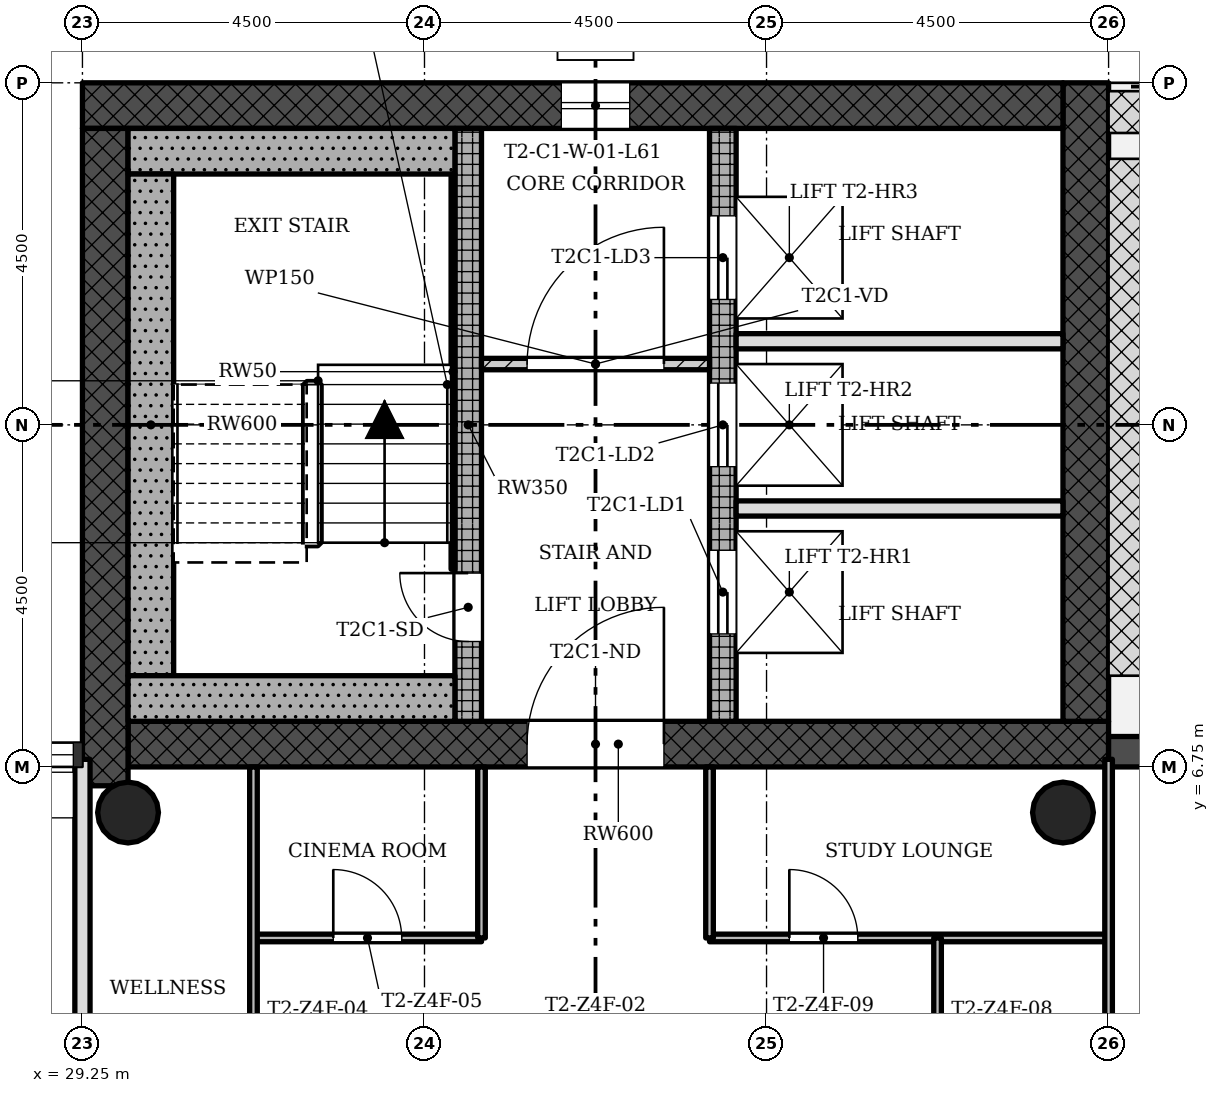
"""IFC4 building model, lengths in metres.
Left out: names, types, materials, properties, quantities, classifications, styles, units other than length and angle.
Written with IfcOpenShell. Run it as: python <this file> out.ifc"""

import sys

from ifc_helpers import new_model, si_unit, direction, frame, frame_2d, origin, origin_2d, place, context, subcontext, project, spatial, rectangle, hollow_circle, extrude, element, fill, save


model = new_model("IFC4")
c1 = context("Model", 3, precision=1e-05, world=origin(), true_north=direction((0.0, 1.0)))
c2 = subcontext(c1, "Body", "Model", "MODEL_VIEW")
j1 = project(units=[si_unit("LENGTHUNIT", "METRE"), si_unit("PLANEANGLEUNIT", "RADIAN")], contexts=[c1])
p1 = place(None, origin())
s1 = spatial("IfcSite", under=j1, at=p1, CompositionType="ELEMENT")
p2 = place(p1, origin())
s2 = spatial("IfcBuilding", under=s1, at=p2, CompositionType="ELEMENT")
p3 = place(p2, frame((0.0, 0.0, 219.8)))
s3 = spatial("IfcBuildingStorey", under=s2, at=p3, CompositionType="ELEMENT", Elevation=219.8)
p4 = place(p3, frame((29.85, 7.05, 0.0), z_axis=(0.0, 0.0, 1.0), x_axis=(1.0, 0.0, 0.0)))
e1 = element("IfcWall", 1, at=p4, inside=s3, PredefinedType="SHEAR", context=c2, shape_type="SweptSolid", body=[
    extrude(rectangle(XDim=12.9, YDim=0.6, at=frame_2d((6.45, 0.0))), origin(), (0.0, 0.0, 1.0), 3.4),
])
p5 = place(p4, frame((5.25, 0.0, 0.0)))
e2 = element("IfcOpeningElement", 2, at=p5, cuts=e1, PredefinedType="OPENING", context=c2, shape_type="SweptSolid", body=[
    extrude(rectangle(XDim=1.8, YDim=2.1, at=frame_2d((0.9, 1.05))), frame((0.0, 0.31, 0.0), z_axis=(0.0, -1.0, 0.0), x_axis=(1.0, 0.0, 0.0)), (0.0, 0.0, 1.0), 0.62),
])
p6 = place(p3, frame((42.45, 7.35, 0.0), z_axis=(0.0, 0.0, 1.0), x_axis=(0.0, 1.0, 0.0)))
e3 = element("IfcWall", 3, at=p6, inside=s3, PredefinedType="SHEAR", context=c2, shape_type="SweptSolid", body=[
    extrude(rectangle(XDim=8.4, YDim=0.6, at=frame_2d((4.2, 0.0))), origin(), (0.0, 0.0, 1.0), 3.4),
])
p7 = place(p3, frame((42.15, 15.45, 0.0), z_axis=(0.0, 0.0, 1.0), x_axis=(-1.0, 0.0, 0.0)))
e4 = element("IfcWall", 4, at=p7, inside=s3, PredefinedType="SHEAR", context=c2, shape_type="SweptSolid", body=[
    extrude(rectangle(XDim=12.9, YDim=0.6, at=frame_2d((6.45, 0.0))), origin(), (0.0, 0.0, 1.0), 3.4),
])
p8 = place(p7, frame((5.7, 0.0, 0.45)))
e5 = element("IfcOpeningElement", 5, at=p8, cuts=e4, PredefinedType="OPENING", context=c2, shape_type="SweptSolid", body=[
    extrude(rectangle(XDim=0.9, YDim=2.4, at=frame_2d((0.45, 1.2))), frame((0.0, 0.31, 0.0), z_axis=(0.0, -1.0, 0.0), x_axis=(1.0, 0.0, 0.0)), (0.0, 0.0, 1.0), 0.62),
])
p9 = place(p3, frame((29.55, 15.15, 0.0), z_axis=(0.0, 0.0, 1.0), x_axis=(0.0, -1.0, 0.0)))
e6 = element("IfcWall", 6, at=p9, inside=s3, PredefinedType="SHEAR", context=c2, shape_type="SweptSolid", body=[
    extrude(rectangle(XDim=8.648, YDim=0.6, at=frame_2d((4.324, 0.0))), origin(), (0.0, 0.0, 1.0), 3.4),
])
p10 = place(p3, frame((34.325, 7.35, 0.0), z_axis=(0.0, 0.0, 1.0), x_axis=(0.0, 1.0, 0.0)))
e7 = element("IfcWall", 7, at=p10, inside=s3, PredefinedType="SHEAR", context=c2, shape_type="SweptSolid", body=[
    extrude(rectangle(XDim=7.8, YDim=0.35, at=frame_2d((3.9, 0.0))), origin(), (0.0, 0.0, 1.0), 3.4),
])
p11 = place(p10, frame((1.05, 0.0, 0.0)))
e8 = element("IfcOpeningElement", 8, at=p11, cuts=e7, PredefinedType="OPENING", context=c2, shape_type="SweptSolid", body=[
    extrude(rectangle(XDim=0.9, YDim=2.1, at=frame_2d((0.45, 1.05))), frame((0.0, 0.185, 0.0), z_axis=(0.0, -1.0, 0.0), x_axis=(1.0, 0.0, 0.0)), (0.0, 0.0, 1.0), 0.37),
])
p12 = place(p3, frame((37.675, 7.35, 0.0), z_axis=(0.0, 0.0, 1.0), x_axis=(0.0, 1.0, 0.0)))
e9 = element("IfcWall", 9, at=p12, inside=s3, PredefinedType="SHEAR", context=c2, shape_type="SweptSolid", body=[
    extrude(rectangle(XDim=7.8, YDim=0.35, at=frame_2d((3.9, 0.0))), origin(), (0.0, 0.0, 1.0), 3.4),
])
p13 = place(p12, frame((1.15, 0.0, 0.0)))
e10 = element("IfcOpeningElement", 10, at=p13, cuts=e9, PredefinedType="OPENING", context=c2, shape_type="SweptSolid", body=[
    extrude(rectangle(XDim=1.1, YDim=2.1, at=frame_2d((0.55, 1.05))), frame((0.0, 0.185, 0.0), z_axis=(0.0, -1.0, 0.0), x_axis=(1.0, 0.0, 0.0)), (0.0, 0.0, 1.0), 0.37),
])
p14 = place(p12, frame((3.35, 0.0, 0.0)))
e11 = element("IfcOpeningElement", 11, at=p14, cuts=e9, PredefinedType="OPENING", context=c2, shape_type="SweptSolid", body=[
    extrude(rectangle(XDim=1.1, YDim=2.1, at=frame_2d((0.55, 1.05))), frame((0.0, 0.185, 0.0), z_axis=(0.0, -1.0, 0.0), x_axis=(1.0, 0.0, 0.0)), (0.0, 0.0, 1.0), 0.37),
])
p15 = place(p12, frame((5.55, 0.0, 0.0)))
e12 = element("IfcOpeningElement", 12, at=p15, cuts=e9, PredefinedType="OPENING", context=c2, shape_type="SweptSolid", body=[
    extrude(rectangle(XDim=1.1, YDim=2.1, at=frame_2d((0.55, 1.05))), frame((0.0, 0.185, 0.0), z_axis=(0.0, -1.0, 0.0), x_axis=(1.0, 0.0, 0.0)), (0.0, 0.0, 1.0), 0.37),
])
for number, where, z_axis, x_axis in (
    (13, (42.15, 6.15, 0.0), (0.0, 0.0, 1.0), (1.0, 0.0, 0.0)),
    (14, (29.85, 6.15, 0.0), (0.0, 0.0, 1.0), (1.0, 0.0, 0.0)),
):
    element("IfcColumn", number, at=place(p3, frame(where, z_axis=z_axis, x_axis=x_axis)), inside=s3, PredefinedType="COLUMN", context=c2, shape_type="SweptSolid", body=[
        extrude(hollow_circle(Radius=0.4, WallThickness=0.028, at=origin_2d()), origin(), (0.0, 0.0, 1.0), 3.4),
    ])
p16 = place(p3, frame((47.25, 6.95, -0.02), z_axis=(0.0, 0.0, 1.0), x_axis=(-1.0, 0.0, 0.0)))
e15 = element("IfcWall", 15, at=p16, inside=s3, PredefinedType="STANDARD", context=c2, shape_type="SweptSolid", body=[
    extrude(rectangle(XDim=4.5, YDim=0.4, at=frame_2d((2.25, 0.0))), origin(), (0.0, 0.0, 1.0), 3.12),
])
p17 = place(p16, frame((1.35, 0.0, 0.02)))
e16 = element("IfcOpeningElement", 16, at=p17, cuts=e15, PredefinedType="OPENING", context=c2, shape_type="SweptSolid", body=[
    extrude(rectangle(XDim=1.8, YDim=2.1, at=frame_2d((0.9, 1.05))), frame((0.0, 0.21, 0.0), z_axis=(0.0, -1.0, 0.0), x_axis=(1.0, 0.0, 0.0)), (0.0, 0.0, 1.0), 0.42),
])
p18 = place(p3, frame((37.5, 12.05, 0.0), z_axis=(0.0, 0.0, 1.0), x_axis=(-1.0, 0.0, 0.0)))
e17 = element("IfcWall", 17, at=p18, inside=s3, PredefinedType="PARTITIONING", context=c2, shape_type="SweptSolid", body=[
    extrude(rectangle(XDim=3.0, YDim=0.15, at=frame_2d((1.5, 0.0))), origin(), (0.0, 0.0, 1.0), 3.0),
])
p19 = place(p18, frame((0.6, 0.0, 0.0)))
e18 = element("IfcOpeningElement", 18, at=p19, cuts=e17, PredefinedType="OPENING", context=c2, shape_type="SweptSolid", body=[
    extrude(rectangle(XDim=1.8, YDim=2.1, at=frame_2d((0.9, 1.05))), frame((0.0, 0.085, 0.0), z_axis=(0.0, -1.0, 0.0), x_axis=(1.0, 0.0, 0.0)), (0.0, 0.0, 1.0), 0.17),
])
for number, where, z_axis, x_axis in (
    (19, (42.15, 10.15, 0.0), (0.0, 0.0, 1.0), (-1.0, 0.0, 0.0)),
    (20, (42.15, 12.35, 0.0), (0.0, 0.0, 1.0), (-1.0, 0.0, 0.0)),
):
    element("IfcWall", number, at=place(p3, frame(where, z_axis=z_axis, x_axis=x_axis)), inside=s3, PredefinedType="SOLIDWALL", context=c2, shape_type="SweptSolid", body=[
        extrude(rectangle(XDim=4.3, YDim=0.2, at=frame_2d((2.15, 0.0))), origin(), (0.0, 0.0, 1.0), 3.0),
    ])
p20 = place(p3, frame((42.75, 4.5, 0.0), z_axis=(0.0, 0.0, 1.0), x_axis=(-1.0, 0.0, 0.0)))
e21 = element("IfcWall", 21, at=p20, inside=s3, PredefinedType="PARTITIONING", context=c2, shape_type="SweptSolid", body=[
    extrude(rectangle(XDim=5.25, YDim=0.1, at=frame_2d((2.625, 0.0))), origin(), (0.0, 0.0, 1.0), 3.0),
])
p21 = place(p20, frame((3.3, 0.0, 0.0)))
e22 = element("IfcOpeningElement", 22, at=p21, cuts=e21, PredefinedType="OPENING", context=c2, shape_type="SweptSolid", body=[
    extrude(rectangle(XDim=0.9, YDim=2.1, at=frame_2d((0.45, 1.05))), frame((0.0, 0.06, 0.0), z_axis=(0.0, -1.0, 0.0), x_axis=(1.0, 0.0, 0.0)), (0.0, 0.0, 1.0), 0.12),
])
p22 = place(p3, frame((34.5, 4.5, 0.0), z_axis=(0.0, 0.0, 1.0), x_axis=(-1.0, 0.0, 0.0)))
e23 = element("IfcWall", 23, at=p22, inside=s3, PredefinedType="PARTITIONING", context=c2, shape_type="SweptSolid", body=[
    extrude(rectangle(XDim=3.0, YDim=0.1, at=frame_2d((1.5, 0.0))), origin(), (0.0, 0.0, 1.0), 3.0),
])
p23 = place(p22, frame((1.05, 0.0, 0.0)))
e24 = element("IfcOpeningElement", 24, at=p23, cuts=e23, PredefinedType="OPENING", context=c2, shape_type="SweptSolid", body=[
    extrude(rectangle(XDim=0.9, YDim=2.1, at=frame_2d((0.45, 1.05))), frame((0.0, 0.06, 0.0), z_axis=(0.0, -1.0, 0.0), x_axis=(1.0, 0.0, 0.0)), (0.0, 0.0, 1.0), 0.12),
])
p24 = place(p3, frame((42.75, 0.9, 0.0), z_axis=(0.0, 0.0, 1.0), x_axis=(0.0, 1.0, 0.0)))
e25 = element("IfcWall", 25, at=p24, inside=s3, PredefinedType="PARTITIONING", context=c2, shape_type="SweptSolid", body=[
    extrude(rectangle(XDim=5.95, YDim=0.1, at=frame_2d((2.975, 0.0))), origin(), (0.0, 0.0, 1.0), 3.0),
])
p25 = place(p3, frame((40.5, 0.9, 0.0), z_axis=(0.0, 0.0, 1.0), x_axis=(0.0, 1.0, 0.0)))
e26 = element("IfcWall", 26, at=p25, inside=s3, PredefinedType="PARTITIONING", context=c2, shape_type="SweptSolid", body=[
    extrude(rectangle(XDim=3.6, YDim=0.1, at=frame_2d((1.8, 0.0))), origin(), (0.0, 0.0, 1.0), 3.0),
])
p26 = place(p25, frame((1.35, 0.0, 0.0)))
e27 = element("IfcOpeningElement", 27, at=p26, cuts=e26, PredefinedType="OPENING", context=c2, shape_type="SweptSolid", body=[
    extrude(rectangle(XDim=0.9, YDim=2.1, at=frame_2d((0.45, 1.05))), frame((0.0, 0.06, 0.0), z_axis=(0.0, -1.0, 0.0), x_axis=(1.0, 0.0, 0.0)), (0.0, 0.0, 1.0), 0.12),
])
for number, where, z_axis, x_axis in (
    (28, (37.5, 4.5, 0.0), (0.0, 0.0, 1.0), (0.0, 1.0, 0.0)),
    (29, (34.5, 4.5, 0.0), (0.0, 0.0, 1.0), (0.0, 1.0, 0.0)),
):
    element("IfcWall", number, at=place(p3, frame(where, z_axis=z_axis, x_axis=x_axis)), inside=s3, PredefinedType="PARTITIONING", context=c2, shape_type="SweptSolid", body=[
        extrude(rectangle(XDim=2.25, YDim=0.1, at=frame_2d((1.125, 0.0))), origin(), (0.0, 0.0, 1.0), 3.0),
    ])
p27 = place(p3, frame((31.5, 0.9, 0.0), z_axis=(0.0, 0.0, 1.0), x_axis=(0.0, 1.0, 0.0)))
e30 = element("IfcWall", 30, at=p27, inside=s3, PredefinedType="PARTITIONING", context=c2, shape_type="SweptSolid", body=[
    extrude(rectangle(XDim=5.85, YDim=0.1, at=frame_2d((2.925, 0.0))), origin(), (0.0, 0.0, 1.0), 3.0),
])
p28 = place(p27, frame((1.35, 0.0, 0.0)))
e31 = element("IfcOpeningElement", 31, at=p28, cuts=e30, PredefinedType="OPENING", context=c2, shape_type="SweptSolid", body=[
    extrude(rectangle(XDim=0.9, YDim=2.1, at=frame_2d((0.45, 1.05))), frame((0.0, 0.06, 0.0), z_axis=(0.0, -1.0, 0.0), x_axis=(1.0, 0.0, 0.0)), (0.0, 0.0, 1.0), 0.12),
])
p29 = place(p3, frame((29.25, -6.85, 0.0), z_axis=(0.0, 0.0, 1.0), x_axis=(0.0, 1.0, 0.0)))
e32 = element("IfcWall", 32, at=p29, inside=s3, PredefinedType="SOLIDWALL", context=c2, shape_type="SweptSolid", body=[
    extrude(rectangle(XDim=13.7, YDim=0.2, at=frame_2d((6.85, 0.0))), origin(), (0.0, 0.0, 1.0), 3.0),
])
p30 = place(p29, frame((6.4, 0.0, 0.0)))
e33 = element("IfcOpeningElement", 33, at=p30, cuts=e32, PredefinedType="OPENING", context=c2, shape_type="SweptSolid", body=[
    extrude(rectangle(XDim=0.9, YDim=2.1, at=frame_2d((0.45, 1.05))), frame((0.0, 0.11, 0.0), z_axis=(0.0, -1.0, 0.0), x_axis=(1.0, 0.0, 0.0)), (0.0, 0.0, 1.0), 0.22),
])
p31 = place(p3, frame((34.15, 14.85, 0.0), z_axis=(0.0, 0.0, 1.0), x_axis=(-1.0, 0.0, 0.0)))
e34 = element("IfcWall", 34, at=p31, inside=s3, PredefinedType="SHEAR", context=c2, shape_type="SweptSolid", body=[
    extrude(rectangle(XDim=4.3, YDim=0.6, at=frame_2d((2.15, 0.0))), origin(), (0.0, 0.0, 1.0), 3.4),
])
p32 = place(p3, frame((30.15, 7.95, 0.0), z_axis=(0.0, 0.0, 1.0), x_axis=(0.0, 1.0, 0.0)))
e35 = element("IfcWall", 35, at=p32, inside=s3, PredefinedType="SHEAR", context=c2, shape_type="SweptSolid", body=[
    extrude(rectangle(XDim=6.6, YDim=0.6, at=frame_2d((3.3, 0.0))), origin(), (0.0, 0.0, 1.0), 3.4),
])
p33 = place(p3, frame((34.15, 7.65, 0.0), z_axis=(0.0, 0.0, 1.0), x_axis=(-1.0, 0.0, 0.0)))
e36 = element("IfcWall", 36, at=p33, inside=s3, PredefinedType="SHEAR", context=c2, shape_type="SweptSolid", body=[
    extrude(rectangle(XDim=4.3, YDim=0.6, at=frame_2d((2.15, 0.0))), origin(), (0.0, 0.0, 1.0), 3.4),
])
p34 = place(p3, frame((34.125, 9.35, 0.0), z_axis=(0.0, 0.0, 1.0), x_axis=(0.0, 1.0, 0.0)))
e37 = element("IfcWall", 37, at=p34, inside=s3, PredefinedType="SHEAR", context=c2, shape_type="SweptSolid", body=[
    extrude(rectangle(XDim=5.2, YDim=0.05, at=frame_2d((2.6, 0.0))), origin(), (0.0, 0.0, 1.0), 3.4),
])
p35 = place(p8, origin())
e38 = element("IfcWindow", 38, at=p35, inside=s3, PartitioningType="SINGLE_PANEL", PredefinedType="WINDOW", context=c2, shape_type="SweptSolid", body=[
    extrude(rectangle(XDim=0.9, YDim=2.4, at=frame_2d((0.45, 1.2))), frame((0.0, 0.03, 0.0), z_axis=(0.0, -1.0, 0.0), x_axis=(1.0, 0.0, 0.0)), (0.0, 0.0, 1.0), 0.06),
])
fill(e5, e38)
p36 = place(p19, origin())
e39 = element("IfcDoor", 39, at=p36, inside=s3, OperationType="SINGLE_SWING_LEFT", PredefinedType="DOOR", context=c2, shape_type="SweptSolid", body=[
    extrude(rectangle(XDim=1.8, YDim=2.1, at=frame_2d((0.9, 1.05))), frame((0.0, 0.025, 0.0), z_axis=(0.0, -1.0, 0.0), x_axis=(1.0, 0.0, 0.0)), (0.0, 0.0, 1.0), 0.05),
])
fill(e18, e39)
p37 = place(p23, origin())
e40 = element("IfcDoor", 40, at=p37, inside=s3, OperationType="SINGLE_SWING_RIGHT", PredefinedType="DOOR", context=c2, shape_type="SweptSolid", body=[
    extrude(rectangle(XDim=0.9, YDim=2.1, at=frame_2d((0.45, 1.05))), frame((0.0, 0.025, 0.0), z_axis=(0.0, -1.0, 0.0), x_axis=(1.0, 0.0, 0.0)), (0.0, 0.0, 1.0), 0.05),
])
fill(e24, e40)
p38 = place(p21, origin())
e41 = element("IfcDoor", 41, at=p38, inside=s3, OperationType="SINGLE_SWING_RIGHT", PredefinedType="DOOR", context=c2, shape_type="SweptSolid", body=[
    extrude(rectangle(XDim=0.9, YDim=2.1, at=frame_2d((0.45, 1.05))), frame((0.0, 0.025, 0.0), z_axis=(0.0, -1.0, 0.0), x_axis=(1.0, 0.0, 0.0)), (0.0, 0.0, 1.0), 0.05),
])
fill(e22, e41)
p39 = place(p11, origin())
e42 = element("IfcDoor", 42, at=p39, inside=s3, OperationType="SINGLE_SWING_LEFT", PredefinedType="DOOR", context=c2, shape_type="SweptSolid", body=[
    extrude(rectangle(XDim=0.9, YDim=2.1, at=frame_2d((0.45, 1.05))), frame((0.0, 0.025, 0.0), z_axis=(0.0, -1.0, 0.0), x_axis=(1.0, 0.0, 0.0)), (0.0, 0.0, 1.0), 0.05),
])
fill(e8, e42)
p40 = place(p13, origin())
e43 = element("IfcDoor", 43, at=p40, inside=s3, OperationType="SLIDING_TO_LEFT", PredefinedType="DOOR", context=c2, shape_type="SweptSolid", body=[
    extrude(rectangle(XDim=1.1, YDim=2.1, at=frame_2d((0.55, 1.05))), frame((0.0, 0.025, 0.0), z_axis=(0.0, -1.0, 0.0), x_axis=(1.0, 0.0, 0.0)), (0.0, 0.0, 1.0), 0.05),
])
fill(e10, e43)
p41 = place(p14, origin())
e44 = element("IfcDoor", 44, at=p41, inside=s3, OperationType="SLIDING_TO_LEFT", PredefinedType="DOOR", context=c2, shape_type="SweptSolid", body=[
    extrude(rectangle(XDim=1.1, YDim=2.1, at=frame_2d((0.55, 1.05))), frame((0.0, 0.025, 0.0), z_axis=(0.0, -1.0, 0.0), x_axis=(1.0, 0.0, 0.0)), (0.0, 0.0, 1.0), 0.05),
])
fill(e11, e44)
p42 = place(p15, origin())
e45 = element("IfcDoor", 45, at=p42, inside=s3, OperationType="SLIDING_TO_LEFT", PredefinedType="DOOR", context=c2, shape_type="SweptSolid", body=[
    extrude(rectangle(XDim=1.1, YDim=2.1, at=frame_2d((0.55, 1.05))), frame((0.0, 0.025, 0.0), z_axis=(0.0, -1.0, 0.0), x_axis=(1.0, 0.0, 0.0)), (0.0, 0.0, 1.0), 0.05),
])
fill(e12, e45)
p43 = place(p5, origin())
e46 = element("IfcDoor", 46, at=p43, inside=s3, OperationType="SINGLE_SWING_LEFT", PredefinedType="DOOR", context=c2, shape_type="SweptSolid", body=[
    extrude(rectangle(XDim=1.8, YDim=2.1, at=frame_2d((0.9, 1.05))), frame((0.0, 0.025, 0.0), z_axis=(0.0, -1.0, 0.0), x_axis=(1.0, 0.0, 0.0)), (0.0, 0.0, 1.0), 0.05),
])
fill(e2, e46)
save(model, sys.argv[1])
